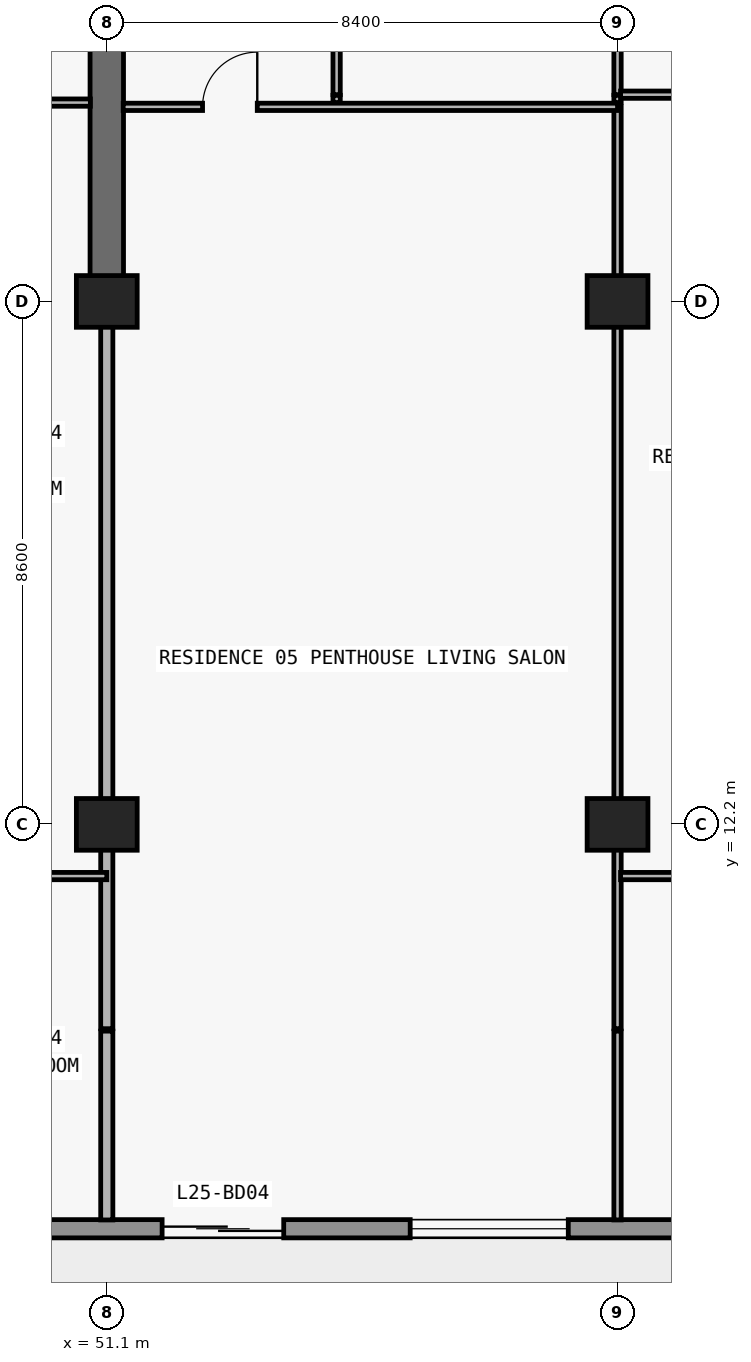
"""IFC4 building model, lengths in metres.
Left out: names, types, materials, properties, quantities, classifications, styles, units other than length and angle.
Written with IfcOpenShell. Run it as: python <this file> out.ifc"""

import sys

from ifc_helpers import new_model, si_unit, direction, frame, frame_2d, origin, origin_2d, place, context, subcontext, project, spatial, rectangle, extrude, element, fill, save


model = new_model("IFC4")
c1 = context("Model", 3, precision=1e-05, world=origin(), true_north=direction((0.0, 1.0)))
c2 = subcontext(c1, "Body", "Model", "MODEL_VIEW")
j1 = project(units=[si_unit("LENGTHUNIT", "METRE"), si_unit("PLANEANGLEUNIT", "RADIAN")], contexts=[c1])
p1 = place(None, origin())
s1 = spatial("IfcSite", under=j1, at=p1, CompositionType="ELEMENT")
p2 = place(p1, origin())
s2 = spatial("IfcBuilding", under=s1, at=p2, CompositionType="ELEMENT")
p3 = place(p2, frame((0.0, 0.0, 94.5)))
s3 = spatial("IfcBuildingStorey", under=s2, at=p3, CompositionType="ELEMENT", Elevation=94.5)
for number, where, z_axis, x_axis in (
    (1, (51.1, 12.2, 0.0), (0.0, 0.0, 1.0), (1.0, 0.0, 0.0)),
    (2, (59.5, 12.2, 0.0), (0.0, 0.0, 1.0), (1.0, 0.0, 0.0)),
    (3, (51.1, 20.8, 0.0), (0.0, 0.0, 1.0), (1.0, 0.0, 0.0)),
    (4, (59.5, 20.8, 0.0), (0.0, 0.0, 1.0), (1.0, 0.0, 0.0)),
):
    element("IfcColumn", number, at=place(p3, frame(where, z_axis=z_axis, x_axis=x_axis)), inside=s3, PredefinedType="COLUMN", context=c2, shape_type="SweptSolid", body=[
        extrude(rectangle(XDim=1.0, YDim=0.85, at=origin_2d()), origin(), (0.0, 0.0, 1.0), 3.0),
    ])
p4 = place(p3, frame((51.1, 20.8, 0.0), z_axis=(0.0, 0.0, 1.0), x_axis=(0.0, 1.0, 0.0)))
e5 = element("IfcWall", 5, at=p4, inside=s3, PredefinedType="SHEAR", context=c2, shape_type="SweptSolid", body=[
    extrude(rectangle(XDim=8.6, YDim=0.55, at=frame_2d((4.3, 0.0))), origin(), (0.0, 0.0, 1.0), 3.0),
])
p5 = place(p3, frame((70.1, 5.55, 0.0), z_axis=(0.0, 0.0, 1.0), x_axis=(-1.0, 0.0, 0.0)))
e6 = element("IfcWall", 6, at=p5, inside=s3, PredefinedType="STANDARD", context=c2, shape_type="SweptSolid", body=[
    extrude(rectangle(XDim=62.4, YDim=0.3, at=frame_2d((31.2, 0.0))), origin(), (0.0, 0.0, 1.0), 3.0),
])
p6 = place(p5, frame((57.29, 0.0, 0.0)))
e7 = element("IfcOpeningElement", 7, at=p6, cuts=e6, PredefinedType="OPENING", context=c2, shape_type="SweptSolid", body=[
    extrude(rectangle(XDim=2.0, YDim=2.3, at=frame_2d((1.0, 1.15))), frame((0.0, 0.16, 0.0), z_axis=(0.0, -1.0, 0.0), x_axis=(1.0, 0.0, 0.0)), (0.0, 0.0, 1.0), 0.32),
])
p7 = place(p5, frame((52.61, 0.0, 0.65)))
e8 = element("IfcOpeningElement", 8, at=p7, cuts=e6, PredefinedType="OPENING", context=c2, shape_type="SweptSolid", body=[
    extrude(rectangle(XDim=2.6, YDim=1.85, at=frame_2d((1.3, 0.925))), frame((0.0, 0.16, 0.0), z_axis=(0.0, -1.0, 0.0), x_axis=(1.0, 0.0, 0.0)), (0.0, 0.0, 1.0), 0.32),
])
p8 = place(p5, frame((46.5, 0.0, 0.85)))
e9 = element("IfcOpeningElement", 9, at=p8, cuts=e6, PredefinedType="OPENING", context=c2, shape_type="SweptSolid", body=[
    extrude(rectangle(XDim=2.2, YDim=1.55, at=frame_2d((1.1, 0.775))), frame((0.0, 0.16, 0.0), z_axis=(0.0, -1.0, 0.0), x_axis=(1.0, 0.0, 0.0)), (0.0, 0.0, 1.0), 0.32),
])
p9 = place(p5, frame((40.09, 0.0, 0.0)))
e10 = element("IfcOpeningElement", 10, at=p9, cuts=e6, PredefinedType="OPENING", context=c2, shape_type="SweptSolid", body=[
    extrude(rectangle(XDim=2.0, YDim=2.3, at=frame_2d((1.0, 1.15))), frame((0.0, 0.16, 0.0), z_axis=(0.0, -1.0, 0.0), x_axis=(1.0, 0.0, 0.0)), (0.0, 0.0, 1.0), 0.32),
])
p10 = place(p5, frame((35.99, 0.0, 0.85)))
e11 = element("IfcOpeningElement", 11, at=p10, cuts=e6, PredefinedType="OPENING", context=c2, shape_type="SweptSolid", body=[
    extrude(rectangle(XDim=1.8, YDim=1.55, at=frame_2d((0.9, 0.775))), frame((0.0, 0.16, 0.0), z_axis=(0.0, -1.0, 0.0), x_axis=(1.0, 0.0, 0.0)), (0.0, 0.0, 1.0), 0.32),
])
p11 = place(p5, frame((28.314, 0.0, 0.85)))
e12 = element("IfcOpeningElement", 12, at=p11, cuts=e6, PredefinedType="OPENING", context=c2, shape_type="SweptSolid", body=[
    extrude(rectangle(XDim=2.2, YDim=1.55, at=frame_2d((1.1, 0.775))), frame((0.0, 0.16, 0.0), z_axis=(0.0, -1.0, 0.0), x_axis=(1.0, 0.0, 0.0)), (0.0, 0.0, 1.0), 0.32),
])
p12 = place(p5, frame((24.09, 0.0, 0.0)))
e13 = element("IfcOpeningElement", 13, at=p12, cuts=e6, PredefinedType="OPENING", context=c2, shape_type="SweptSolid", body=[
    extrude(rectangle(XDim=2.0, YDim=2.3, at=frame_2d((1.0, 1.15))), frame((0.0, 0.16, 0.0), z_axis=(0.0, -1.0, 0.0), x_axis=(1.0, 0.0, 0.0)), (0.0, 0.0, 1.0), 0.32),
])
p13 = place(p5, frame((19.99, 0.0, 0.85)))
e14 = element("IfcOpeningElement", 14, at=p13, cuts=e6, PredefinedType="OPENING", context=c2, shape_type="SweptSolid", body=[
    extrude(rectangle(XDim=1.8, YDim=1.55, at=frame_2d((0.9, 0.775))), frame((0.0, 0.16, 0.0), z_axis=(0.0, -1.0, 0.0), x_axis=(1.0, 0.0, 0.0)), (0.0, 0.0, 1.0), 0.32),
])
p14 = place(p5, frame((16.09, 0.0, 0.0)))
e15 = element("IfcOpeningElement", 15, at=p14, cuts=e6, PredefinedType="OPENING", context=c2, shape_type="SweptSolid", body=[
    extrude(rectangle(XDim=2.0, YDim=2.3, at=frame_2d((1.0, 1.15))), frame((0.0, 0.16, 0.0), z_axis=(0.0, -1.0, 0.0), x_axis=(1.0, 0.0, 0.0)), (0.0, 0.0, 1.0), 0.32),
])
p15 = place(p5, frame((11.41, 0.0, 0.65)))
e16 = element("IfcOpeningElement", 16, at=p15, cuts=e6, PredefinedType="OPENING", context=c2, shape_type="SweptSolid", body=[
    extrude(rectangle(XDim=2.6, YDim=1.85, at=frame_2d((1.3, 0.925))), frame((0.0, 0.16, 0.0), z_axis=(0.0, -1.0, 0.0), x_axis=(1.0, 0.0, 0.0)), (0.0, 0.0, 1.0), 0.32),
])
p16 = place(p5, frame((5.3, 0.0, 0.85)))
e17 = element("IfcOpeningElement", 17, at=p16, cuts=e6, PredefinedType="OPENING", context=c2, shape_type="SweptSolid", body=[
    extrude(rectangle(XDim=2.2, YDim=1.55, at=frame_2d((1.1, 0.775))), frame((0.0, 0.16, 0.0), z_axis=(0.0, -1.0, 0.0), x_axis=(1.0, 0.0, 0.0)), (0.0, 0.0, 1.0), 0.32),
])
p17 = place(p3, frame((51.1, 5.695, 0.0), z_axis=(0.0, 0.0, 1.0), x_axis=(0.0, 1.0, 0.0)))
e18 = element("IfcWall", 18, at=p17, inside=s3, PredefinedType="PARTITIONING", context=c2, shape_type="SweptSolid", body=[
    extrude(rectangle(XDim=3.105, YDim=0.2, at=frame_2d((1.552, 0.0))), origin(), (0.0, 0.0, 1.0), 3.0),
])
p18 = place(p3, frame((51.1, 8.84, 0.0), z_axis=(0.0, 0.0, 1.0), x_axis=(0.0, 1.0, 0.0)))
e19 = element("IfcWall", 19, at=p18, inside=s3, PredefinedType="PARTITIONING", context=c2, shape_type="SweptSolid", body=[
    extrude(rectangle(XDim=11.955, YDim=0.2, at=frame_2d((5.978, 0.0))), origin(), (0.0, 0.0, 1.0), 2.124),
])
p19 = place(p3, frame((54.88, 24.07, 0.0), z_axis=(0.0, 0.0, 1.0), x_axis=(0.0, 1.0, 0.0)))
e20 = element("IfcWall", 20, at=p19, inside=s3, PredefinedType="PARTITIONING", context=c2, shape_type="SweptSolid", body=[
    extrude(rectangle(XDim=0.12, YDim=0.12, at=frame_2d((0.06, 0.0))), origin(), (0.0, 0.0, 1.0), 3.0),
])
p20 = place(p3, frame((54.88, 24.2, 0.0), z_axis=(0.0, 0.0, 1.0), x_axis=(0.0, 1.0, 0.0)))
e21 = element("IfcWall", 21, at=p20, inside=s3, PredefinedType="PARTITIONING", context=c2, shape_type="SweptSolid", body=[
    extrude(rectangle(XDim=4.6, YDim=0.12, at=frame_2d((2.3, 0.0))), origin(), (0.0, 0.0, 1.0), 3.0),
])
p21 = place(p20, frame((1.85, 0.0, 0.0)))
e22 = element("IfcOpeningElement", 22, at=p21, cuts=e21, PredefinedType="OPENING", context=c2, shape_type="SweptSolid", body=[
    extrude(rectangle(XDim=0.9, YDim=2.15, at=frame_2d((0.45, 1.075))), frame((0.0, 0.07, 0.0), z_axis=(0.0, -1.0, 0.0), x_axis=(1.0, 0.0, 0.0)), (0.0, 0.0, 1.0), 0.14),
])
p22 = place(p3, frame((59.5, 5.695, 0.0), z_axis=(0.0, 0.0, 1.0), x_axis=(0.0, 1.0, 0.0)))
e23 = element("IfcWall", 23, at=p22, inside=s3, PredefinedType="PARTITIONING", context=c2, shape_type="SweptSolid", body=[
    extrude(rectangle(XDim=3.105, YDim=0.12, at=frame_2d((1.552, 0.0))), origin(), (0.0, 0.0, 1.0), 3.0),
])
p23 = place(p3, frame((59.5, 8.84, 0.0), z_axis=(0.0, 0.0, 1.0), x_axis=(0.0, 1.0, 0.0)))
e24 = element("IfcWall", 24, at=p23, inside=s3, PredefinedType="PARTITIONING", context=c2, shape_type="SweptSolid", body=[
    extrude(rectangle(XDim=15.16, YDim=0.12, at=frame_2d((7.58, 0.0))), origin(), (0.0, 0.0, 1.0), 2.124),
])
p24 = place(p3, frame((59.5, 24.07, 0.0), z_axis=(0.0, 0.0, 1.0), x_axis=(0.0, 1.0, 0.0)))
e25 = element("IfcWall", 25, at=p24, inside=s3, PredefinedType="PARTITIONING", context=c2, shape_type="SweptSolid", body=[
    extrude(rectangle(XDim=0.12, YDim=0.12, at=frame_2d((0.06, 0.0))), origin(), (0.0, 0.0, 1.0), 2.124),
])
p25 = place(p3, frame((59.5, 24.2, 0.0), z_axis=(0.0, 0.0, 1.0), x_axis=(0.0, 1.0, 0.0)))
e26 = element("IfcWall", 26, at=p25, inside=s3, PredefinedType="PARTITIONING", context=c2, shape_type="SweptSolid", body=[
    extrude(rectangle(XDim=5.14, YDim=0.12, at=frame_2d((2.57, 0.0))), origin(), (0.0, 0.0, 1.0), 2.124),
])
p26 = place(p25, frame((1.75, 0.0, 0.0)))
e27 = element("IfcOpeningElement", 27, at=p26, cuts=e26, PredefinedType="OPENING", context=c2, shape_type="SweptSolid", body=[
    extrude(rectangle(XDim=0.9, YDim=2.074, at=frame_2d((0.45, 1.037))), frame((0.0, 0.07, 0.0), z_axis=(0.0, -1.0, 0.0), x_axis=(1.0, 0.0, 0.0)), (0.0, 0.0, 1.0), 0.14),
])
p27 = place(p3, frame((47.32, 11.35, 0.0), z_axis=(0.0, 0.0, 1.0), x_axis=(1.0, 0.0, 0.0)))
e28 = element("IfcWall", 28, at=p27, inside=s3, PredefinedType="PARTITIONING", context=c2, shape_type="SweptSolid", body=[
    extrude(rectangle(XDim=3.78, YDim=0.12, at=frame_2d((1.89, 0.0))), origin(), (0.0, 0.0, 1.0), 3.0),
])
p28 = place(p27, frame((1.44, 0.0, 0.0)))
e29 = element("IfcOpeningElement", 29, at=p28, cuts=e28, PredefinedType="OPENING", context=c2, shape_type="SweptSolid", body=[
    extrude(rectangle(XDim=0.9, YDim=2.15, at=frame_2d((0.45, 1.075))), frame((0.0, 0.07, 0.0), z_axis=(0.0, -1.0, 0.0), x_axis=(1.0, 0.0, 0.0)), (0.0, 0.0, 1.0), 0.14),
])
p29 = place(p3, frame((59.55, 11.35, 0.0), z_axis=(0.0, 0.0, 1.0), x_axis=(1.0, 0.0, 0.0)))
e30 = element("IfcWall", 30, at=p29, inside=s3, PredefinedType="PARTITIONING", context=c2, shape_type="SweptSolid", body=[
    extrude(rectangle(XDim=8.35, YDim=0.12, at=frame_2d((4.175, 0.0))), origin(), (0.0, 0.0, 1.0), 3.0),
])
p30 = place(p29, frame((3.725, 0.0, 0.0)))
e31 = element("IfcOpeningElement", 31, at=p30, cuts=e30, PredefinedType="OPENING", context=c2, shape_type="SweptSolid", body=[
    extrude(rectangle(XDim=0.9, YDim=2.15, at=frame_2d((0.45, 1.075))), frame((0.0, 0.07, 0.0), z_axis=(0.0, -1.0, 0.0), x_axis=(1.0, 0.0, 0.0)), (0.0, 0.0, 1.0), 0.14),
])
p31 = place(p3, frame((51.37, 24.0, 0.0), z_axis=(0.0, 0.0, 1.0), x_axis=(1.0, 0.0, 0.0)))
e32 = element("IfcWall", 32, at=p31, inside=s3, PredefinedType="PARTITIONING", context=c2, shape_type="SweptSolid", body=[
    extrude(rectangle(XDim=8.13, YDim=0.12, at=frame_2d((4.065, 0.0))), origin(), (0.0, 0.0, 1.0), 3.0),
])
p32 = place(p31, frame((1.305, 0.0, 0.0)))
e33 = element("IfcOpeningElement", 33, at=p32, cuts=e32, PredefinedType="OPENING", context=c2, shape_type="SweptSolid", body=[
    extrude(rectangle(XDim=0.9, YDim=2.15, at=frame_2d((0.45, 1.075))), frame((0.0, 0.07, 0.0), z_axis=(0.0, -1.0, 0.0), x_axis=(1.0, 0.0, 0.0)), (0.0, 0.0, 1.0), 0.14),
])
p33 = place(p3, frame((42.7, 24.07, 0.0), z_axis=(0.0, 0.0, 1.0), x_axis=(1.0, 0.0, 0.0)))
e34 = element("IfcWall", 34, at=p33, inside=s3, PredefinedType="PARTITIONING", context=c2, shape_type="SweptSolid", body=[
    extrude(rectangle(XDim=8.13, YDim=0.12, at=frame_2d((4.065, 0.0))), origin(), (0.0, 0.0, 1.0), 3.0),
])
p34 = place(p33, frame((1.86, 0.0, 0.0)))
e35 = element("IfcOpeningElement", 35, at=p34, cuts=e34, PredefinedType="OPENING", context=c2, shape_type="SweptSolid", body=[
    extrude(rectangle(XDim=0.9, YDim=2.15, at=frame_2d((0.45, 1.075))), frame((0.0, 0.07, 0.0), z_axis=(0.0, -1.0, 0.0), x_axis=(1.0, 0.0, 0.0)), (0.0, 0.0, 1.0), 0.14),
])
p35 = place(p33, frame((6.008, 0.0, 0.0)))
e36 = element("IfcOpeningElement", 36, at=p35, cuts=e34, PredefinedType="OPENING", context=c2, shape_type="SweptSolid", body=[
    extrude(rectangle(XDim=0.9, YDim=2.15, at=frame_2d((0.45, 1.075))), frame((0.0, 0.07, 0.0), z_axis=(0.0, -1.0, 0.0), x_axis=(1.0, 0.0, 0.0)), (0.0, 0.0, 1.0), 0.14),
])
p36 = place(p3, frame((59.55, 24.2, 0.0), z_axis=(0.0, 0.0, 1.0), x_axis=(1.0, 0.0, 0.0)))
e37 = element("IfcWall", 37, at=p36, inside=s3, PredefinedType="PARTITIONING", context=c2, shape_type="SweptSolid", body=[
    extrude(rectangle(XDim=8.35, YDim=0.12, at=frame_2d((4.175, 0.0))), origin(), (0.0, 0.0, 1.0), 3.0),
])
p37 = place(p36, frame((3.725, 0.0, 0.0)))
e38 = element("IfcOpeningElement", 38, at=p37, cuts=e37, PredefinedType="OPENING", context=c2, shape_type="SweptSolid", body=[
    extrude(rectangle(XDim=0.9, YDim=2.15, at=frame_2d((0.45, 1.075))), frame((0.0, 0.07, 0.0), z_axis=(0.0, -1.0, 0.0), x_axis=(1.0, 0.0, 0.0)), (0.0, 0.0, 1.0), 0.14),
])
p38 = place(p14, origin())
e39 = element("IfcDoor", 39, at=p38, inside=s3, OperationType="DOUBLE_DOOR_SLIDING", PredefinedType="DOOR", context=c2, shape_type="SweptSolid", body=[
    extrude(rectangle(XDim=2.0, YDim=2.3, at=frame_2d((1.0, 1.15))), frame((0.0, 0.025, 0.0), z_axis=(0.0, -1.0, 0.0), x_axis=(1.0, 0.0, 0.0)), (0.0, 0.0, 1.0), 0.05),
])
fill(e15, e39)
p39 = place(p15, origin())
e40 = element("IfcWindow", 40, at=p39, inside=s3, PartitioningType="SINGLE_PANEL", PredefinedType="WINDOW", context=c2, shape_type="SweptSolid", body=[
    extrude(rectangle(XDim=2.6, YDim=1.85, at=frame_2d((1.3, 0.925))), frame((0.0, 0.03, 0.0), z_axis=(0.0, -1.0, 0.0), x_axis=(1.0, 0.0, 0.0)), (0.0, 0.0, 1.0), 0.06),
])
fill(e16, e40)
p40 = place(p32, origin())
e41 = element("IfcDoor", 41, at=p40, inside=s3, OperationType="SINGLE_SWING_RIGHT", PredefinedType="DOOR", context=c2, shape_type="SweptSolid", body=[
    extrude(rectangle(XDim=0.9, YDim=2.15, at=frame_2d((0.45, 1.075))), frame((0.0, 0.025, 0.0), z_axis=(0.0, -1.0, 0.0), x_axis=(1.0, 0.0, 0.0)), (0.0, 0.0, 1.0), 0.05),
])
fill(e33, e41)
save(model, sys.argv[1])
